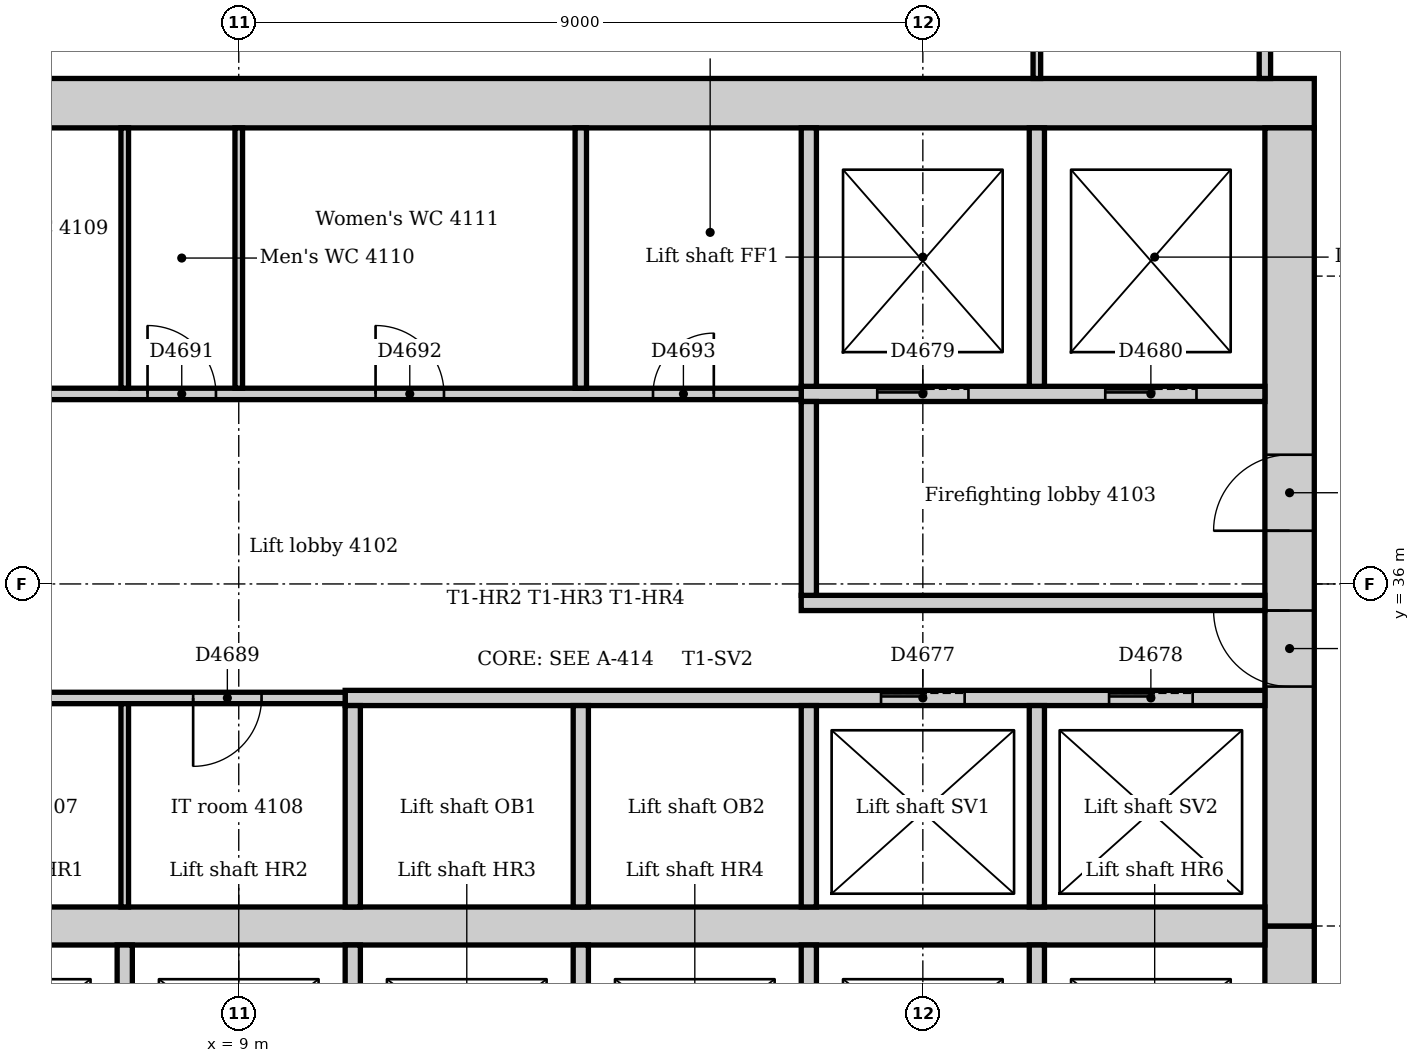
"""IFC4 building model, lengths in metres.
Left out: names, types, materials, properties, quantities, classifications, styles, units other than length and angle.
Written with IfcOpenShell. Run it as: python <this file> out.ifc"""

import sys

from ifc_helpers import new_model, si_unit, direction, frame, frame_2d, origin, place, context, subcontext, project, spatial, rectangle, extrude, element, fill, save


model = new_model("IFC4")
c1 = context("Model", 3, precision=1e-05, world=origin(), true_north=direction((0.0, 1.0)))
c2 = subcontext(c1, "Body", "Model", "MODEL_VIEW")
j1 = project(units=[si_unit("LENGTHUNIT", "METRE"), si_unit("PLANEANGLEUNIT", "RADIAN")], contexts=[c1])
p1 = place(None, origin())
s1 = spatial("IfcSite", under=j1, at=p1, CompositionType="ELEMENT")
p2 = place(p1, origin())
s2 = spatial("IfcBuilding", under=s1, at=p2, CompositionType="ELEMENT")
p3 = place(p2, frame((0.0, 0.0, 173.0)))
s3 = spatial("IfcBuildingStorey", under=s2, at=p3, CompositionType="ELEMENT", Elevation=173.0)
p4 = place(p3, frame((23.15, 42.325, 0.0), z_axis=(0.0, 0.0, 1.0), x_axis=(-1.0, 0.0, 0.0)))
e1 = element("IfcWall", 1, at=p4, inside=s3, PredefinedType="SOLIDWALL", context=c2, shape_type="SweptSolid", body=[
    extrude(rectangle(XDim=19.25, YDim=0.65, at=frame_2d((9.625, 0.0))), origin(), (0.0, 0.0, 1.0), 4.0),
])
p5 = place(p3, frame((22.825, 21.0, 0.0), z_axis=(0.0, 0.0, 1.0), x_axis=(0.0, 1.0, 0.0)))
e2 = element("IfcWall", 2, at=p5, inside=s3, PredefinedType="SOLIDWALL", context=c2, shape_type="SweptSolid", body=[
    extrude(rectangle(XDim=10.5, YDim=0.65, at=frame_2d((5.25, 0.0))), origin(), (0.0, 0.0, 1.0), 4.0),
])
p6 = place(p5, frame((4.35, 0.0, 0.0)))
e3 = element("IfcOpeningElement", 3, at=p6, cuts=e2, PredefinedType="OPENING", context=c2, shape_type="SweptSolid", body=[
    extrude(rectangle(XDim=1.8, YDim=2.1, at=frame_2d((0.9, 1.05))), frame((0.0, 0.335, 0.0), z_axis=(0.0, -1.0, 0.0), x_axis=(1.0, 0.0, 0.0)), (0.0, 0.0, 1.0), 0.67),
])
p7 = place(p3, frame((22.825, 31.5, 0.0), z_axis=(0.0, 0.0, 1.0), x_axis=(0.0, 1.0, 0.0)))
e4 = element("IfcWall", 4, at=p7, inside=s3, PredefinedType="SOLIDWALL", context=c2, shape_type="SweptSolid", body=[
    extrude(rectangle(XDim=10.5, YDim=0.65, at=frame_2d((5.25, 0.0))), origin(), (0.0, 0.0, 1.0), 4.0),
])
p8 = place(p7, frame((3.15, 0.0, 0.0)))
e5 = element("IfcOpeningElement", 5, at=p8, cuts=e4, PredefinedType="OPENING", context=c2, shape_type="SweptSolid", body=[
    extrude(rectangle(XDim=1.0, YDim=2.1, at=frame_2d((0.5, 1.05))), frame((0.0, 0.335, 0.0), z_axis=(0.0, -1.0, 0.0), x_axis=(1.0, 0.0, 0.0)), (0.0, 0.0, 1.0), 0.67),
])
p9 = place(p7, frame((5.2, 0.0, 0.0)))
e6 = element("IfcOpeningElement", 6, at=p9, cuts=e4, PredefinedType="OPENING", context=c2, shape_type="SweptSolid", body=[
    extrude(rectangle(XDim=1.0, YDim=2.1, at=frame_2d((0.5, 1.05))), frame((0.0, 0.335, 0.0), z_axis=(0.0, -1.0, 0.0), x_axis=(1.0, 0.0, 0.0)), (0.0, 0.0, 1.0), 0.67),
])
p10 = place(p3, frame((4.5, 31.5, 0.0), z_axis=(0.0, 0.0, 1.0), x_axis=(1.0, 0.0, 0.0)))
e7 = element("IfcWall", 7, at=p10, inside=s3, PredefinedType="SOLIDWALL", context=c2, shape_type="SweptSolid", body=[
    extrude(rectangle(XDim=18.0, YDim=0.5, at=frame_2d((9.0, 0.0))), origin(), (0.0, 0.0, 1.0), 4.0),
])
p11 = place(p3, frame((16.4, 35.75, 0.0), z_axis=(0.0, 0.0, 1.0), x_axis=(1.0, 0.0, 0.0)))
e8 = element("IfcWall", 8, at=p11, inside=s3, PredefinedType="PARTITIONING", context=c2, shape_type="SweptSolid", body=[
    extrude(rectangle(XDim=6.1, YDim=0.2, at=frame_2d((3.05, 0.0))), origin(), (0.0, 0.0, 1.0), 3.85),
])
p12 = place(p3, frame((16.4, 38.5, 0.0), z_axis=(0.0, 0.0, 1.0), x_axis=(1.0, 0.0, 0.0)))
e9 = element("IfcWall", 9, at=p12, inside=s3, PredefinedType="PARTITIONING", context=c2, shape_type="SweptSolid", body=[
    extrude(rectangle(XDim=6.1, YDim=0.2, at=frame_2d((3.05, 0.0))), origin(), (0.0, 0.0, 1.0), 3.85),
])
p13 = place(p12, frame((1.0, 0.0, 0.0)))
e10 = element("IfcOpeningElement", 10, at=p13, cuts=e9, PredefinedType="OPENING", context=c2, shape_type="SweptSolid", body=[
    extrude(rectangle(XDim=1.2, YDim=2.1, at=frame_2d((0.6, 1.05))), frame((0.0, 0.11, 0.0), z_axis=(0.0, -1.0, 0.0), x_axis=(1.0, 0.0, 0.0)), (0.0, 0.0, 1.0), 0.22),
])
p14 = place(p12, frame((4.0, 0.0, 0.0)))
e11 = element("IfcOpeningElement", 11, at=p14, cuts=e9, PredefinedType="OPENING", context=c2, shape_type="SweptSolid", body=[
    extrude(rectangle(XDim=1.2, YDim=2.1, at=frame_2d((0.6, 1.05))), frame((0.0, 0.11, 0.0), z_axis=(0.0, -1.0, 0.0), x_axis=(1.0, 0.0, 0.0)), (0.0, 0.0, 1.0), 0.22),
])
p15 = place(p3, frame((16.5, 35.85, 0.0), z_axis=(0.0, 0.0, 1.0), x_axis=(0.0, 1.0, 0.0)))
e12 = element("IfcWall", 12, at=p15, inside=s3, PredefinedType="PARTITIONING", context=c2, shape_type="SweptSolid", body=[
    extrude(rectangle(XDim=2.55, YDim=0.2, at=frame_2d((1.275, 0.0))), origin(), (0.0, 0.0, 1.0), 3.85),
])
p16 = place(p3, frame((10.4, 34.5, 0.0), z_axis=(0.0, 0.0, 1.0), x_axis=(1.0, 0.0, 0.0)))
e13 = element("IfcWall", 13, at=p16, inside=s3, PredefinedType="PARTITIONING", context=c2, shape_type="SweptSolid", body=[
    extrude(rectangle(XDim=12.1, YDim=0.2, at=frame_2d((6.05, 0.0))), origin(), (0.0, 0.0, 1.0), 3.85),
])
p17 = place(p16, frame((7.05, 0.0, 0.0)))
e14 = element("IfcOpeningElement", 14, at=p17, cuts=e13, PredefinedType="OPENING", context=c2, shape_type="SweptSolid", body=[
    extrude(rectangle(XDim=1.1, YDim=2.1, at=frame_2d((0.55, 1.05))), frame((0.0, 0.11, 0.0), z_axis=(0.0, -1.0, 0.0), x_axis=(1.0, 0.0, 0.0)), (0.0, 0.0, 1.0), 0.22),
])
p18 = place(p16, frame((10.05, 0.0, 0.0)))
e15 = element("IfcOpeningElement", 15, at=p18, cuts=e13, PredefinedType="OPENING", context=c2, shape_type="SweptSolid", body=[
    extrude(rectangle(XDim=1.1, YDim=2.1, at=frame_2d((0.55, 1.05))), frame((0.0, 0.11, 0.0), z_axis=(0.0, -1.0, 0.0), x_axis=(1.0, 0.0, 0.0)), (0.0, 0.0, 1.0), 0.22),
])
for number, where, z_axis, x_axis in (
    (16, (10.5, 28.6, 0.0), (0.0, 0.0, 1.0), (0.0, 1.0, 0.0)),
    (17, (10.5, 31.75, 0.0), (0.0, 0.0, 1.0), (0.0, 1.0, 0.0)),
    (18, (13.5, 28.6, 0.0), (0.0, 0.0, 1.0), (0.0, 1.0, 0.0)),
    (19, (13.5, 31.75, 0.0), (0.0, 0.0, 1.0), (0.0, 1.0, 0.0)),
    (20, (16.5, 28.6, 0.0), (0.0, 0.0, 1.0), (0.0, 1.0, 0.0)),
    (21, (16.5, 31.75, 0.0), (0.0, 0.0, 1.0), (0.0, 1.0, 0.0)),
    (22, (19.5, 28.6, 0.0), (0.0, 0.0, 1.0), (0.0, 1.0, 0.0)),
    (23, (19.5, 31.75, 0.0), (0.0, 0.0, 1.0), (0.0, 1.0, 0.0)),
):
    element("IfcWall", number, at=place(p3, frame(where, z_axis=z_axis, x_axis=x_axis)), inside=s3, PredefinedType="PARTITIONING", context=c2, shape_type="SweptSolid", body=[
        extrude(rectangle(XDim=2.65, YDim=0.2, at=frame_2d((1.325, 0.0))), origin(), (0.0, 0.0, 1.0), 3.85),
    ])
for number, where, z_axis, x_axis in (
    (24, (16.5, 38.6, 0.0), (0.0, 0.0, 1.0), (0.0, 1.0, 0.0)),
    (25, (19.5, 38.6, 0.0), (0.0, 0.0, 1.0), (0.0, 1.0, 0.0)),
):
    element("IfcWall", number, at=place(p3, frame(where, z_axis=z_axis, x_axis=x_axis)), inside=s3, PredefinedType="PARTITIONING", context=c2, shape_type="SweptSolid", body=[
        extrude(rectangle(XDim=3.4, YDim=0.2, at=frame_2d((1.7, 0.0))), origin(), (0.0, 0.0, 1.0), 3.85),
    ])
p19 = place(p3, frame((7.5, 28.6, 0.0), z_axis=(0.0, 0.0, 1.0), x_axis=(0.0, 1.0, 0.0)))
e26 = element("IfcWall", 26, at=p19, inside=s3, PredefinedType="PARTITIONING", context=c2, shape_type="SweptSolid", body=[
    extrude(rectangle(XDim=2.65, YDim=0.2, at=frame_2d((1.325, 0.0))), origin(), (0.0, 0.0, 1.0), 3.85),
])
p20 = place(p3, frame((4.5, 38.5, 0.0), z_axis=(0.0, 0.0, 1.0), x_axis=(1.0, 0.0, 0.0)))
e27 = element("IfcWall", 27, at=p20, inside=s3, PredefinedType="PARTITIONING", context=c2, shape_type="SweptSolid", body=[
    extrude(rectangle(XDim=11.9, YDim=0.15, at=frame_2d((5.95, 0.0))), origin(), (0.0, 0.0, 1.0), 3.85),
])
p21 = place(p20, frame((1.1, 0.0, 0.0)))
e28 = element("IfcOpeningElement", 28, at=p21, cuts=e27, PredefinedType="OPENING", context=c2, shape_type="SweptSolid", body=[
    extrude(rectangle(XDim=0.9, YDim=2.1, at=frame_2d((0.45, 1.05))), frame((0.0, 0.085, 0.0), z_axis=(0.0, -1.0, 0.0), x_axis=(1.0, 0.0, 0.0)), (0.0, 0.0, 1.0), 0.17),
])
p22 = place(p20, frame((3.3, 0.0, 0.0)))
e29 = element("IfcOpeningElement", 29, at=p22, cuts=e27, PredefinedType="OPENING", context=c2, shape_type="SweptSolid", body=[
    extrude(rectangle(XDim=0.9, YDim=2.1, at=frame_2d((0.45, 1.05))), frame((0.0, 0.085, 0.0), z_axis=(0.0, -1.0, 0.0), x_axis=(1.0, 0.0, 0.0)), (0.0, 0.0, 1.0), 0.17),
])
p23 = place(p20, frame((6.3, 0.0, 0.0)))
e30 = element("IfcOpeningElement", 30, at=p23, cuts=e27, PredefinedType="OPENING", context=c2, shape_type="SweptSolid", body=[
    extrude(rectangle(XDim=0.9, YDim=2.1, at=frame_2d((0.45, 1.05))), frame((0.0, 0.085, 0.0), z_axis=(0.0, -1.0, 0.0), x_axis=(1.0, 0.0, 0.0)), (0.0, 0.0, 1.0), 0.17),
])
p24 = place(p20, frame((9.95, 0.0, 0.0)))
e31 = element("IfcOpeningElement", 31, at=p24, cuts=e27, PredefinedType="OPENING", context=c2, shape_type="SweptSolid", body=[
    extrude(rectangle(XDim=0.8, YDim=2.1, at=frame_2d((0.4, 1.05))), frame((0.0, 0.085, 0.0), z_axis=(0.0, -1.0, 0.0), x_axis=(1.0, 0.0, 0.0)), (0.0, 0.0, 1.0), 0.17),
])
p25 = place(p3, frame((4.5, 34.5, 0.0), z_axis=(0.0, 0.0, 1.0), x_axis=(1.0, 0.0, 0.0)))
e32 = element("IfcWall", 32, at=p25, inside=s3, PredefinedType="PARTITIONING", context=c2, shape_type="SweptSolid", body=[
    extrude(rectangle(XDim=5.9, YDim=0.15, at=frame_2d((2.95, 0.0))), origin(), (0.0, 0.0, 1.0), 3.85),
])
p26 = place(p25, frame((1.1, 0.0, 0.0)))
e33 = element("IfcOpeningElement", 33, at=p26, cuts=e32, PredefinedType="OPENING", context=c2, shape_type="SweptSolid", body=[
    extrude(rectangle(XDim=0.9, YDim=2.1, at=frame_2d((0.45, 1.05))), frame((0.0, 0.085, 0.0), z_axis=(0.0, -1.0, 0.0), x_axis=(1.0, 0.0, 0.0)), (0.0, 0.0, 1.0), 0.17),
])
p27 = place(p25, frame((3.9, 0.0, 0.0)))
e34 = element("IfcOpeningElement", 34, at=p27, cuts=e32, PredefinedType="OPENING", context=c2, shape_type="SweptSolid", body=[
    extrude(rectangle(XDim=0.9, YDim=2.1, at=frame_2d((0.45, 1.05))), frame((0.0, 0.085, 0.0), z_axis=(0.0, -1.0, 0.0), x_axis=(1.0, 0.0, 0.0)), (0.0, 0.0, 1.0), 0.17),
])
p28 = place(p3, frame((22.5, 42.65, 0.0), z_axis=(0.0, 0.0, 1.0), x_axis=(0.0, 1.0, 0.0)))
e35 = element("IfcWall", 35, at=p28, inside=s3, PredefinedType="PARTITIONING", context=c2, shape_type="SweptSolid", body=[
    extrude(rectangle(XDim=2.275, YDim=0.15, at=frame_2d((1.137, 0.0))), origin(), (0.0, 0.0, 1.0), 3.85),
])
p29 = place(p3, frame((13.5, 38.575, 0.0), z_axis=(0.0, 0.0, 1.0), x_axis=(0.0, 1.0, 0.0)))
e36 = element("IfcWall", 36, at=p29, inside=s3, PredefinedType="PARTITIONING", context=c2, shape_type="SweptSolid", body=[
    extrude(rectangle(XDim=3.425, YDim=0.15, at=frame_2d((1.712, 0.0))), origin(), (0.0, 0.0, 1.0), 3.85),
])
p30 = place(p3, frame((19.5, 42.65, 0.0), z_axis=(0.0, 0.0, 1.0), x_axis=(0.0, 1.0, 0.0)))
e37 = element("IfcWall", 37, at=p30, inside=s3, PredefinedType="PARTITIONING", context=c2, shape_type="SweptSolid", body=[
    extrude(rectangle(XDim=10.99, YDim=0.1, at=frame_2d((5.495, 0.0))), origin(), (0.0, 0.0, 1.0), 3.85),
])
p31 = place(p30, frame((5.05, 0.0, 0.0)))
e38 = element("IfcOpeningElement", 38, at=p31, cuts=e37, PredefinedType="OPENING", context=c2, shape_type="SweptSolid", body=[
    extrude(rectangle(XDim=0.9, YDim=2.1, at=frame_2d((0.45, 1.05))), frame((0.0, 0.06, 0.0), z_axis=(0.0, -1.0, 0.0), x_axis=(1.0, 0.0, 0.0)), (0.0, 0.0, 1.0), 0.12),
])
for number, where, z_axis, x_axis in (
    (39, (7.5, 38.575, 0.0), (0.0, 0.0, 1.0), (0.0, 1.0, 0.0)),
    (40, (9.0, 38.575, 0.0), (0.0, 0.0, 1.0), (0.0, 1.0, 0.0)),
):
    element("IfcWall", number, at=place(p3, frame(where, z_axis=z_axis, x_axis=x_axis)), inside=s3, PredefinedType="PARTITIONING", context=c2, shape_type="SweptSolid", body=[
        extrude(rectangle(XDim=3.425, YDim=0.1, at=frame_2d((1.712, 0.0))), origin(), (0.0, 0.0, 1.0), 3.85),
    ])
p32 = place(p3, frame((7.5, 31.75, 0.0), z_axis=(0.0, 0.0, 1.0), x_axis=(0.0, 1.0, 0.0)))
e41 = element("IfcWall", 41, at=p32, inside=s3, PredefinedType="PARTITIONING", context=c2, shape_type="SweptSolid", body=[
    extrude(rectangle(XDim=2.675, YDim=0.1, at=frame_2d((1.337, 0.0))), origin(), (0.0, 0.0, 1.0), 3.85),
])
p33 = place(p17, origin())
e42 = element("IfcDoor", 42, at=p33, inside=s3, OperationType="SLIDING_TO_LEFT", PredefinedType="DOOR", context=c2, shape_type="SweptSolid", body=[
    extrude(rectangle(XDim=1.1, YDim=2.1, at=frame_2d((0.55, 1.05))), frame((0.0, 0.025, 0.0), z_axis=(0.0, -1.0, 0.0), x_axis=(1.0, 0.0, 0.0)), (0.0, 0.0, 1.0), 0.05),
])
fill(e14, e42)
p34 = place(p18, origin())
e43 = element("IfcDoor", 43, at=p34, inside=s3, OperationType="SLIDING_TO_LEFT", PredefinedType="DOOR", context=c2, shape_type="SweptSolid", body=[
    extrude(rectangle(XDim=1.1, YDim=2.1, at=frame_2d((0.55, 1.05))), frame((0.0, 0.025, 0.0), z_axis=(0.0, -1.0, 0.0), x_axis=(1.0, 0.0, 0.0)), (0.0, 0.0, 1.0), 0.05),
])
fill(e15, e43)
p35 = place(p13, origin())
e44 = element("IfcDoor", 44, at=p35, inside=s3, OperationType="SLIDING_TO_LEFT", PredefinedType="DOOR", context=c2, shape_type="SweptSolid", body=[
    extrude(rectangle(XDim=1.2, YDim=2.1, at=frame_2d((0.6, 1.05))), frame((0.0, 0.025, 0.0), z_axis=(0.0, -1.0, 0.0), x_axis=(1.0, 0.0, 0.0)), (0.0, 0.0, 1.0), 0.05),
])
fill(e10, e44)
p36 = place(p14, origin())
e45 = element("IfcDoor", 45, at=p36, inside=s3, OperationType="SLIDING_TO_LEFT", PredefinedType="DOOR", context=c2, shape_type="SweptSolid", body=[
    extrude(rectangle(XDim=1.2, YDim=2.1, at=frame_2d((0.6, 1.05))), frame((0.0, 0.025, 0.0), z_axis=(0.0, -1.0, 0.0), x_axis=(1.0, 0.0, 0.0)), (0.0, 0.0, 1.0), 0.05),
])
fill(e11, e45)
p37 = place(p8, origin())
e46 = element("IfcDoor", 46, at=p37, inside=s3, OperationType="SINGLE_SWING_RIGHT", PredefinedType="DOOR", context=c2, shape_type="SweptSolid", body=[
    extrude(rectangle(XDim=1.0, YDim=2.1, at=frame_2d((0.5, 1.05))), frame((0.0, 0.025, 0.0), z_axis=(0.0, -1.0, 0.0), x_axis=(1.0, 0.0, 0.0)), (0.0, 0.0, 1.0), 0.05),
])
fill(e5, e46)
p38 = place(p9, origin())
e47 = element("IfcDoor", 47, at=p38, inside=s3, OperationType="SINGLE_SWING_LEFT", PredefinedType="DOOR", context=c2, shape_type="SweptSolid", body=[
    extrude(rectangle(XDim=1.0, YDim=2.1, at=frame_2d((0.5, 1.05))), frame((0.0, 0.025, 0.0), z_axis=(0.0, -1.0, 0.0), x_axis=(1.0, 0.0, 0.0)), (0.0, 0.0, 1.0), 0.05),
])
fill(e6, e47)
p39 = place(p27, frame((0.9, 0.0, 0.0), z_axis=(0.0, 0.0, 1.0), x_axis=(-1.0, 0.0, 0.0)))
e48 = element("IfcDoor", 48, at=p39, inside=s3, OperationType="SINGLE_SWING_RIGHT", PredefinedType="DOOR", context=c2, shape_type="SweptSolid", body=[
    extrude(rectangle(XDim=0.9, YDim=2.1, at=frame_2d((0.45, 1.05))), frame((0.0, 0.025, 0.0), z_axis=(0.0, -1.0, 0.0), x_axis=(1.0, 0.0, 0.0)), (0.0, 0.0, 1.0), 0.05),
])
fill(e34, e48)
p40 = place(p22, origin())
e49 = element("IfcDoor", 49, at=p40, inside=s3, OperationType="SINGLE_SWING_LEFT", PredefinedType="DOOR", context=c2, shape_type="SweptSolid", body=[
    extrude(rectangle(XDim=0.9, YDim=2.1, at=frame_2d((0.45, 1.05))), frame((0.0, 0.025, 0.0), z_axis=(0.0, -1.0, 0.0), x_axis=(1.0, 0.0, 0.0)), (0.0, 0.0, 1.0), 0.05),
])
fill(e29, e49)
p41 = place(p23, origin())
e50 = element("IfcDoor", 50, at=p41, inside=s3, OperationType="SINGLE_SWING_LEFT", PredefinedType="DOOR", context=c2, shape_type="SweptSolid", body=[
    extrude(rectangle(XDim=0.9, YDim=2.1, at=frame_2d((0.45, 1.05))), frame((0.0, 0.025, 0.0), z_axis=(0.0, -1.0, 0.0), x_axis=(1.0, 0.0, 0.0)), (0.0, 0.0, 1.0), 0.05),
])
fill(e30, e50)
p42 = place(p24, origin())
e51 = element("IfcDoor", 51, at=p42, inside=s3, OperationType="SINGLE_SWING_RIGHT", PredefinedType="DOOR", context=c2, shape_type="SweptSolid", body=[
    extrude(rectangle(XDim=0.8, YDim=2.1, at=frame_2d((0.4, 1.05))), frame((0.0, 0.025, 0.0), z_axis=(0.0, -1.0, 0.0), x_axis=(1.0, 0.0, 0.0)), (0.0, 0.0, 1.0), 0.05),
])
fill(e31, e51)
save(model, sys.argv[1])
